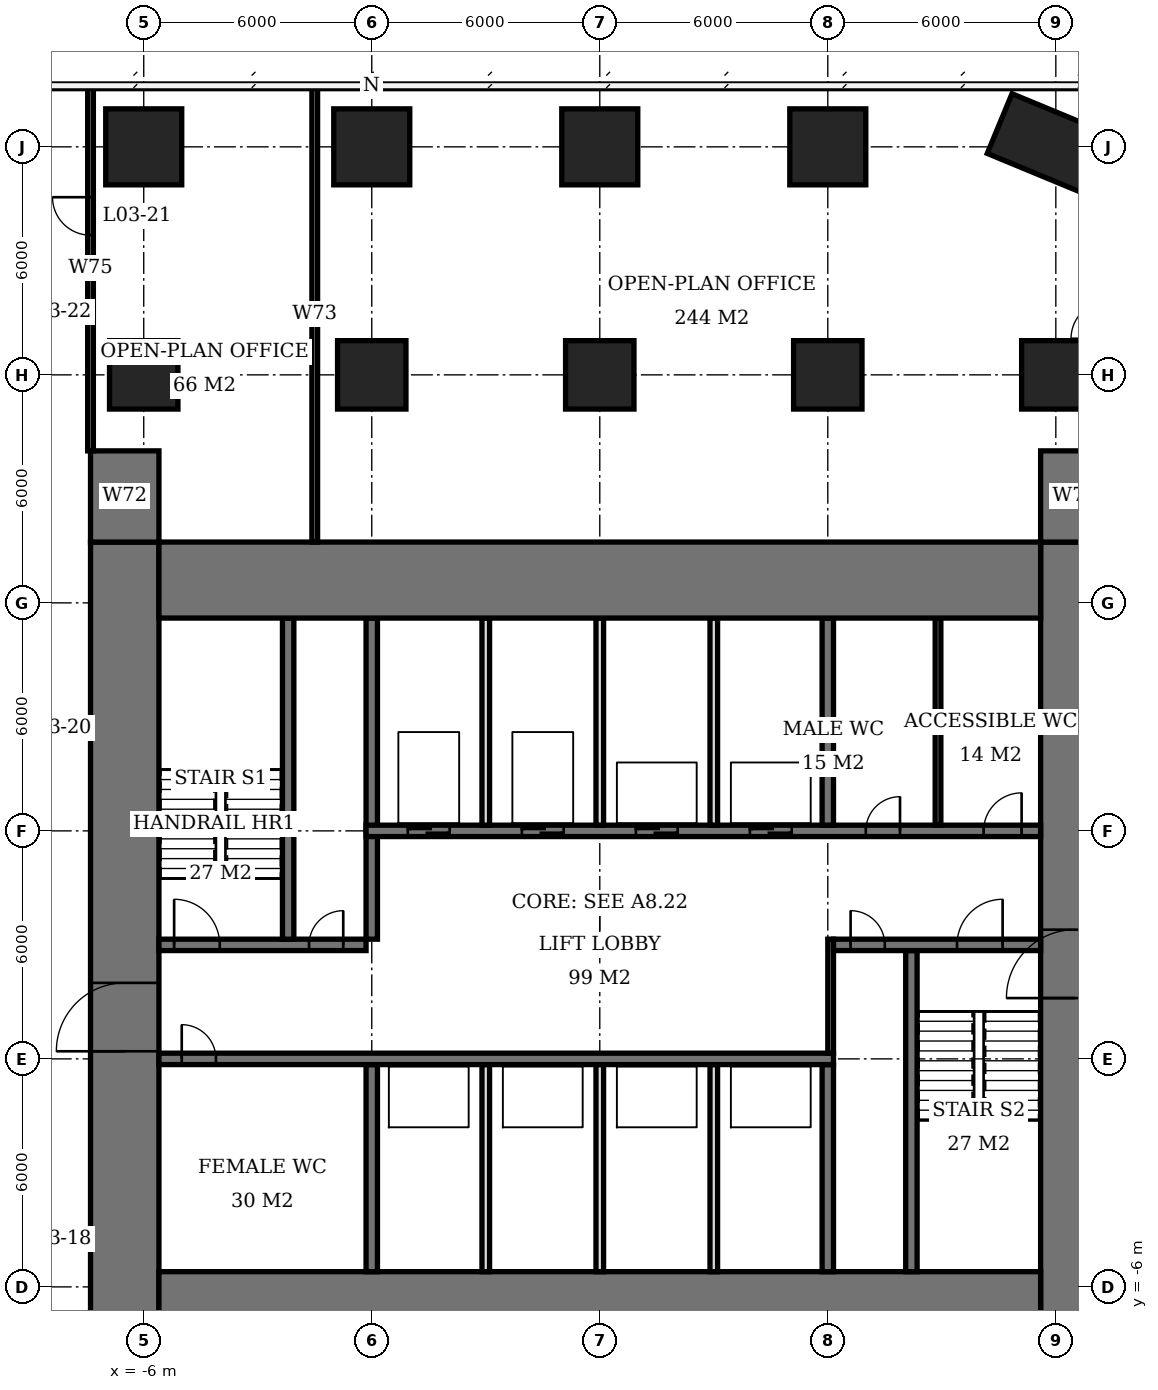
"""IFC4 building model, lengths in metres.
Left out: names, types, materials, properties, quantities, classifications, styles, units other than length and angle.
Written with IfcOpenShell. Run it as: python <this file> out.ifc"""

import sys

from ifc_helpers import new_model, si_unit, direction, frame, frame_2d, origin, origin_2d, place, context, subcontext, project, spatial, rectangle, extrude, element, fill, save


model = new_model("IFC4")
c1 = context("Model", 3, precision=1e-05, world=origin(), true_north=direction((0.0, 1.0)))
c2 = subcontext(c1, "Body", "Model", "MODEL_VIEW")
j1 = project(units=[si_unit("LENGTHUNIT", "METRE"), si_unit("PLANEANGLEUNIT", "RADIAN")], contexts=[c1])
p1 = place(None, origin())
s1 = spatial("IfcSite", under=j1, at=p1, CompositionType="ELEMENT")
p2 = place(p1, origin())
s2 = spatial("IfcBuilding", under=s1, at=p2, CompositionType="ELEMENT")
p3 = place(p2, frame((0.0, 0.0, 18.2)))
s3 = spatial("IfcBuildingStorey", under=s2, at=p3, CompositionType="ELEMENT", Elevation=18.2)
p4 = place(p3, frame((-6.0, 18.0, 0.0), z_axis=(0.0, 0.0, 1.0), x_axis=(1.0, 0.0, 0.0)))
e1 = element("IfcColumn", 1, at=p4, inside=s3, PredefinedType="COLUMN", context=c2, shape_type="SweptSolid", body=[
    extrude(rectangle(XDim=1.8, YDim=1.8, at=origin_2d()), origin(), (0.0, 0.0, 1.0), 3.9),
])
p5 = place(p3, frame((-6.0, 24.0, 0.0), z_axis=(0.0, 0.0, 1.0), x_axis=(1.0, 0.0, 0.0)))
e2 = element("IfcColumn", 2, at=p5, inside=s3, PredefinedType="COLUMN", context=c2, shape_type="SweptSolid", body=[
    extrude(rectangle(XDim=2.0, YDim=2.0, at=origin_2d()), origin(), (0.0, 0.0, 1.0), 3.9),
])
p6 = place(p3, frame((0.0, 18.0, 0.0), z_axis=(0.0, 0.0, 1.0), x_axis=(1.0, 0.0, 0.0)))
e3 = element("IfcColumn", 3, at=p6, inside=s3, PredefinedType="COLUMN", context=c2, shape_type="SweptSolid", body=[
    extrude(rectangle(XDim=1.8, YDim=1.8, at=origin_2d()), origin(), (0.0, 0.0, 1.0), 3.9),
])
p7 = place(p3, frame((0.0, 24.0, 0.0), z_axis=(0.0, 0.0, 1.0), x_axis=(1.0, 0.0, 0.0)))
e4 = element("IfcColumn", 4, at=p7, inside=s3, PredefinedType="COLUMN", context=c2, shape_type="SweptSolid", body=[
    extrude(rectangle(XDim=2.0, YDim=2.0, at=origin_2d()), origin(), (0.0, 0.0, 1.0), 3.9),
])
p8 = place(p3, frame((6.0, 18.0, 0.0), z_axis=(0.0, 0.0, 1.0), x_axis=(1.0, 0.0, 0.0)))
e5 = element("IfcColumn", 5, at=p8, inside=s3, PredefinedType="COLUMN", context=c2, shape_type="SweptSolid", body=[
    extrude(rectangle(XDim=1.8, YDim=1.8, at=origin_2d()), origin(), (0.0, 0.0, 1.0), 3.9),
])
p9 = place(p3, frame((6.0, 24.0, 0.0), z_axis=(0.0, 0.0, 1.0), x_axis=(1.0, 0.0, 0.0)))
e6 = element("IfcColumn", 6, at=p9, inside=s3, PredefinedType="COLUMN", context=c2, shape_type="SweptSolid", body=[
    extrude(rectangle(XDim=2.0, YDim=2.0, at=origin_2d()), origin(), (0.0, 0.0, 1.0), 3.9),
])
p10 = place(p3, frame((12.0, 18.0, 0.0), z_axis=(0.0, 0.0, 1.0), x_axis=(1.0, 0.0, 0.0)))
e7 = element("IfcColumn", 7, at=p10, inside=s3, PredefinedType="COLUMN", context=c2, shape_type="SweptSolid", body=[
    extrude(rectangle(XDim=1.8, YDim=1.8, at=origin_2d()), origin(), (0.0, 0.0, 1.0), 3.9),
])
p11 = place(p3, frame((12.0, 24.0, 0.0), z_axis=(0.0, 0.0, 1.0), x_axis=(1.0, 0.0, 0.0)))
e8 = element("IfcColumn", 8, at=p11, inside=s3, PredefinedType="COLUMN", context=c2, shape_type="SweptSolid", body=[
    extrude(rectangle(XDim=2.0, YDim=2.0, at=origin_2d()), origin(), (0.0, 0.0, 1.0), 3.9),
])
p12 = place(p3, frame((18.0, 18.0, 0.0), z_axis=(0.0, 0.0, 1.0), x_axis=(1.0, 0.0, 0.0)))
e9 = element("IfcColumn", 9, at=p12, inside=s3, PredefinedType="COLUMN", context=c2, shape_type="SweptSolid", body=[
    extrude(rectangle(XDim=1.8, YDim=1.8, at=origin_2d()), origin(), (0.0, 0.0, 1.0), 3.9),
])
p13 = place(p3, frame((18.0, 24.0, 0.0), z_axis=(0.0, 0.0, 1.0), x_axis=(0.923879532511, -0.382683432365, 0.0)))
e10 = element("IfcColumn", 10, at=p13, inside=s3, PredefinedType="COLUMN", context=c2, shape_type="SweptSolid", body=[
    extrude(rectangle(XDim=3.2, YDim=1.7, at=origin_2d()), origin(), (0.0, 0.0, 1.0), 3.9),
])
for number, where, z_axis, x_axis in (
    (11, (-5.6, -6.6, 0.0), (0.0, 0.0, 1.0), (1.0, 0.0, 0.0)),
    (12, (-5.6, 12.6, 0.0), (0.0, 0.0, 1.0), (1.0, 0.0, 0.0)),
):
    element("IfcWall", number, at=place(p3, frame(where, z_axis=z_axis, x_axis=x_axis)), inside=s3, PredefinedType="SHEAR", context=c2, shape_type="SweptSolid", body=[
        extrude(rectangle(XDim=23.2, YDim=2.0, at=frame_2d((11.6, 0.0))), origin(), (0.0, 0.0, 1.0), 3.9),
    ])
p14 = place(p3, frame((-6.5, -7.6, 0.0), z_axis=(0.0, 0.0, 1.0), x_axis=(0.0, 1.0, 0.0)))
e13 = element("IfcWall", 13, at=p14, inside=s3, PredefinedType="SHEAR", context=c2, shape_type="SweptSolid", body=[
    extrude(rectangle(XDim=21.2, YDim=1.8, at=frame_2d((10.6, 0.0))), origin(), (0.0, 0.0, 1.0), 3.9),
])
p15 = place(p14, frame((7.8, 0.0, 0.0)))
e14 = element("IfcOpeningElement", 14, at=p15, cuts=e13, PredefinedType="OPENING", context=c2, shape_type="SweptSolid", body=[
    extrude(rectangle(XDim=1.8, YDim=2.4, at=frame_2d((0.9, 1.2))), frame((0.0, 0.91, 0.0), z_axis=(0.0, -1.0, 0.0), x_axis=(1.0, 0.0, 0.0)), (0.0, 0.0, 1.0), 1.82),
])
p16 = place(p3, frame((18.5, -7.6, 0.0), z_axis=(0.0, 0.0, 1.0), x_axis=(0.0, 1.0, 0.0)))
e15 = element("IfcWall", 15, at=p16, inside=s3, PredefinedType="SHEAR", context=c2, shape_type="SweptSolid", body=[
    extrude(rectangle(XDim=21.2, YDim=1.8, at=frame_2d((10.6, 0.0))), origin(), (0.0, 0.0, 1.0), 3.9),
])
p17 = place(p16, frame((9.2, 0.0, 0.0)))
e16 = element("IfcOpeningElement", 16, at=p17, cuts=e15, PredefinedType="OPENING", context=c2, shape_type="SweptSolid", body=[
    extrude(rectangle(XDim=1.8, YDim=2.4, at=frame_2d((0.9, 1.2))), frame((0.0, 0.91, 0.0), z_axis=(0.0, -1.0, 0.0), x_axis=(1.0, 0.0, 0.0)), (0.0, 0.0, 1.0), 1.82),
])
for number, where, z_axis, x_axis in (
    (17, (-6.5, 13.6, 0.0), (0.0, 0.0, 1.0), (0.0, 1.0, 0.0)),
    (18, (18.5, 13.6, 0.0), (0.0, 0.0, 1.0), (0.0, 1.0, 0.0)),
):
    element("IfcWall", number, at=place(p3, frame(where, z_axis=z_axis, x_axis=x_axis)), inside=s3, PredefinedType="SHEAR", context=c2, shape_type="SweptSolid", body=[
        extrude(rectangle(XDim=2.4, YDim=1.8, at=frame_2d((1.2, 0.0))), origin(), (0.0, 0.0, 1.0), 3.9),
    ])
p18 = place(p3, frame((-5.6, 0.0, 0.0), z_axis=(0.0, 0.0, 1.0), x_axis=(1.0, 0.0, 0.0)))
e19 = element("IfcWall", 19, at=p18, inside=s3, PredefinedType="SHEAR", context=c2, shape_type="SweptSolid", body=[
    extrude(rectangle(XDim=17.75, YDim=0.3, at=frame_2d((8.875, 0.0))), origin(), (0.0, 0.0, 1.0), 3.9),
])
p19 = place(p18, frame((0.6, 0.0, 0.0)))
e20 = element("IfcOpeningElement", 20, at=p19, cuts=e19, PredefinedType="OPENING", context=c2, shape_type="SweptSolid", body=[
    extrude(rectangle(XDim=0.9, YDim=2.1, at=frame_2d((0.45, 1.05))), frame((0.0, 0.16, 0.0), z_axis=(0.0, -1.0, 0.0), x_axis=(1.0, 0.0, 0.0)), (0.0, 0.0, 1.0), 0.32),
])
p20 = place(p3, frame((-5.6, 3.0, 0.0), z_axis=(0.0, 0.0, 1.0), x_axis=(1.0, 0.0, 0.0)))
e21 = element("IfcWall", 21, at=p20, inside=s3, PredefinedType="SHEAR", context=c2, shape_type="SweptSolid", body=[
    extrude(rectangle(XDim=5.45, YDim=0.3, at=frame_2d((2.725, 0.0))), origin(), (0.0, 0.0, 1.0), 3.9),
])
p21 = place(p20, frame((0.4, 0.0, 0.0)))
e22 = element("IfcOpeningElement", 22, at=p21, cuts=e21, PredefinedType="OPENING", context=c2, shape_type="SweptSolid", body=[
    extrude(rectangle(XDim=1.2, YDim=2.1, at=frame_2d((0.6, 1.05))), frame((0.0, 0.16, 0.0), z_axis=(0.0, -1.0, 0.0), x_axis=(1.0, 0.0, 0.0)), (0.0, 0.0, 1.0), 0.32),
])
p22 = place(p20, frame((3.95, 0.0, 0.0)))
e23 = element("IfcOpeningElement", 23, at=p22, cuts=e21, PredefinedType="OPENING", context=c2, shape_type="SweptSolid", body=[
    extrude(rectangle(XDim=0.9, YDim=2.1, at=frame_2d((0.45, 1.05))), frame((0.0, 0.16, 0.0), z_axis=(0.0, -1.0, 0.0), x_axis=(1.0, 0.0, 0.0)), (0.0, 0.0, 1.0), 0.32),
])
p23 = place(p3, frame((12.15, 3.0, 0.0), z_axis=(0.0, 0.0, 1.0), x_axis=(1.0, 0.0, 0.0)))
e24 = element("IfcWall", 24, at=p23, inside=s3, PredefinedType="SHEAR", context=c2, shape_type="SweptSolid", body=[
    extrude(rectangle(XDim=5.45, YDim=0.3, at=frame_2d((2.725, 0.0))), origin(), (0.0, 0.0, 1.0), 3.9),
])
p24 = place(p23, frame((3.25, 0.0, 0.0)))
e25 = element("IfcOpeningElement", 25, at=p24, cuts=e24, PredefinedType="OPENING", context=c2, shape_type="SweptSolid", body=[
    extrude(rectangle(XDim=1.2, YDim=2.1, at=frame_2d((0.6, 1.05))), frame((0.0, 0.16, 0.0), z_axis=(0.0, -1.0, 0.0), x_axis=(1.0, 0.0, 0.0)), (0.0, 0.0, 1.0), 0.32),
])
p25 = place(p23, frame((0.45, 0.0, 0.0)))
e26 = element("IfcOpeningElement", 26, at=p25, cuts=e24, PredefinedType="OPENING", context=c2, shape_type="SweptSolid", body=[
    extrude(rectangle(XDim=0.9, YDim=2.1, at=frame_2d((0.45, 1.05))), frame((0.0, 0.16, 0.0), z_axis=(0.0, -1.0, 0.0), x_axis=(1.0, 0.0, 0.0)), (0.0, 0.0, 1.0), 0.32),
])
p26 = place(p3, frame((-0.15, 6.0, 0.0), z_axis=(0.0, 0.0, 1.0), x_axis=(1.0, 0.0, 0.0)))
e27 = element("IfcWall", 27, at=p26, inside=s3, PredefinedType="SHEAR", context=c2, shape_type="SweptSolid", body=[
    extrude(rectangle(XDim=17.75, YDim=0.3, at=frame_2d((8.875, 0.0))), origin(), (0.0, 0.0, 1.0), 3.9),
])
p27 = place(p26, frame((13.15, 0.0, 0.0)))
e28 = element("IfcOpeningElement", 28, at=p27, cuts=e27, PredefinedType="OPENING", context=c2, shape_type="SweptSolid", body=[
    extrude(rectangle(XDim=0.9, YDim=2.1, at=frame_2d((0.45, 1.05))), frame((0.0, 0.16, 0.0), z_axis=(0.0, -1.0, 0.0), x_axis=(1.0, 0.0, 0.0)), (0.0, 0.0, 1.0), 0.32),
])
p28 = place(p26, frame((16.25, 0.0, 0.0)))
e29 = element("IfcOpeningElement", 29, at=p28, cuts=e27, PredefinedType="OPENING", context=c2, shape_type="SweptSolid", body=[
    extrude(rectangle(XDim=1.0, YDim=2.1, at=frame_2d((0.5, 1.05))), frame((0.0, 0.16, 0.0), z_axis=(0.0, -1.0, 0.0), x_axis=(1.0, 0.0, 0.0)), (0.0, 0.0, 1.0), 0.32),
])
p29 = place(p26, frame((1.1, 0.0, 0.0)))
e30 = element("IfcOpeningElement", 30, at=p29, cuts=e27, PredefinedType="OPENING", context=c2, shape_type="SweptSolid", body=[
    extrude(rectangle(XDim=1.1, YDim=2.1, at=frame_2d((0.55, 1.05))), frame((0.0, 0.16, 0.0), z_axis=(0.0, -1.0, 0.0), x_axis=(1.0, 0.0, 0.0)), (0.0, 0.0, 1.0), 0.32),
])
p30 = place(p26, frame((4.1, 0.0, 0.0)))
e31 = element("IfcOpeningElement", 31, at=p30, cuts=e27, PredefinedType="OPENING", context=c2, shape_type="SweptSolid", body=[
    extrude(rectangle(XDim=1.1, YDim=2.1, at=frame_2d((0.55, 1.05))), frame((0.0, 0.16, 0.0), z_axis=(0.0, -1.0, 0.0), x_axis=(1.0, 0.0, 0.0)), (0.0, 0.0, 1.0), 0.32),
])
p31 = place(p26, frame((7.1, 0.0, 0.0)))
e32 = element("IfcOpeningElement", 32, at=p31, cuts=e27, PredefinedType="OPENING", context=c2, shape_type="SweptSolid", body=[
    extrude(rectangle(XDim=1.1, YDim=2.1, at=frame_2d((0.55, 1.05))), frame((0.0, 0.16, 0.0), z_axis=(0.0, -1.0, 0.0), x_axis=(1.0, 0.0, 0.0)), (0.0, 0.0, 1.0), 0.32),
])
p32 = place(p26, frame((10.1, 0.0, 0.0)))
e33 = element("IfcOpeningElement", 33, at=p32, cuts=e27, PredefinedType="OPENING", context=c2, shape_type="SweptSolid", body=[
    extrude(rectangle(XDim=1.1, YDim=2.1, at=frame_2d((0.55, 1.05))), frame((0.0, 0.16, 0.0), z_axis=(0.0, -1.0, 0.0), x_axis=(1.0, 0.0, 0.0)), (0.0, 0.0, 1.0), 0.32),
])
p33 = place(p3, frame((0.0, -5.6, 0.0), z_axis=(0.0, 0.0, 1.0), x_axis=(0.0, 1.0, 0.0)))
e34 = element("IfcWall", 34, at=p33, inside=s3, PredefinedType="SHEAR", context=c2, shape_type="SweptSolid", body=[
    extrude(rectangle(XDim=5.45, YDim=0.3, at=frame_2d((2.725, 0.0))), origin(), (0.0, 0.0, 1.0), 3.9),
])
p34 = place(p3, frame((0.0, 3.15, 0.0), z_axis=(0.0, 0.0, 1.0), x_axis=(0.0, 1.0, 0.0)))
e35 = element("IfcWall", 35, at=p34, inside=s3, PredefinedType="SHEAR", context=c2, shape_type="SweptSolid", body=[
    extrude(rectangle(XDim=8.45, YDim=0.3, at=frame_2d((4.225, 0.0))), origin(), (0.0, 0.0, 1.0), 3.9),
])
for number, where, z_axis, x_axis in (
    (36, (12.0, -5.6, 0.0), (0.0, 0.0, 1.0), (0.0, 1.0, 0.0)),
    (37, (12.0, 6.15, 0.0), (0.0, 0.0, 1.0), (0.0, 1.0, 0.0)),
):
    element("IfcWall", number, at=place(p3, frame(where, z_axis=z_axis, x_axis=x_axis)), inside=s3, PredefinedType="SHEAR", context=c2, shape_type="SweptSolid", body=[
        extrude(rectangle(XDim=5.45, YDim=0.3, at=frame_2d((2.725, 0.0))), origin(), (0.0, 0.0, 1.0), 3.9),
    ])
for number, where, z_axis, x_axis in (
    (38, (-2.2, 3.15, 0.0), (0.0, 0.0, 1.0), (0.0, 1.0, 0.0)),
    (39, (14.2, -5.6, 0.0), (0.0, 0.0, 1.0), (0.0, 1.0, 0.0)),
):
    element("IfcWall", number, at=place(p3, frame(where, z_axis=z_axis, x_axis=x_axis)), inside=s3, PredefinedType="SHEAR", context=c2, shape_type="SweptSolid", body=[
        extrude(rectangle(XDim=8.45, YDim=0.3, at=frame_2d((4.225, 0.0))), origin(), (0.0, 0.0, 1.0), 3.9),
    ])
for number, where, z_axis, x_axis in (
    (40, (3.0, 6.15, 0.0), (0.0, 0.0, 1.0), (0.0, 1.0, 0.0)),
    (41, (6.0, 6.15, 0.0), (0.0, 0.0, 1.0), (0.0, 1.0, 0.0)),
    (42, (9.0, 6.15, 0.0), (0.0, 0.0, 1.0), (0.0, 1.0, 0.0)),
    (43, (3.0, -5.6, 0.0), (0.0, 0.0, 1.0), (0.0, 1.0, 0.0)),
    (44, (6.0, -5.6, 0.0), (0.0, 0.0, 1.0), (0.0, 1.0, 0.0)),
    (45, (9.0, -5.6, 0.0), (0.0, 0.0, 1.0), (0.0, 1.0, 0.0)),
):
    element("IfcWall", number, at=place(p3, frame(where, z_axis=z_axis, x_axis=x_axis)), inside=s3, PredefinedType="SOLIDWALL", context=c2, shape_type="SweptSolid", body=[
        extrude(rectangle(XDim=5.45, YDim=0.2, at=frame_2d((2.725, 0.0))), origin(), (0.0, 0.0, 1.0), 3.9),
    ])
p35 = place(p3, frame((14.9, 6.15, 0.0), z_axis=(0.0, 0.0, 1.0), x_axis=(0.0, 1.0, 0.0)))
e46 = element("IfcWall", 46, at=p35, inside=s3, PredefinedType="PLUMBINGWALL", context=c2, shape_type="SweptSolid", body=[
    extrude(rectangle(XDim=5.45, YDim=0.15, at=frame_2d((2.725, 0.0))), origin(), (0.0, 0.0, 1.0), 3.65),
])
p36 = place(p3, frame((-7.4, 16.0, 0.0), z_axis=(0.0, 0.0, 1.0), x_axis=(0.0, 1.0, 0.0)))
e47 = element("IfcWall", 47, at=p36, inside=s3, PredefinedType="PARTITIONING", context=c2, shape_type="SweptSolid", body=[
    extrude(rectangle(XDim=9.6, YDim=0.15, at=frame_2d((4.8, 0.0))), origin(), (0.0, 0.0, 1.0), 3.65),
])
p37 = place(p36, frame((5.675, 0.0, 0.0)))
e48 = element("IfcOpeningElement", 48, at=p37, cuts=e47, PredefinedType="OPENING", context=c2, shape_type="SweptSolid", body=[
    extrude(rectangle(XDim=1.0, YDim=2.1, at=frame_2d((0.5, 1.05))), frame((0.0, 0.085, 0.0), z_axis=(0.0, -1.0, 0.0), x_axis=(1.0, 0.0, 0.0)), (0.0, 0.0, 1.0), 0.17),
])
p38 = place(p3, frame((-1.5, 13.6, 0.0), z_axis=(0.0, 0.0, 1.0), x_axis=(0.0, 1.0, 0.0)))
e49 = element("IfcWall", 49, at=p38, inside=s3, PredefinedType="PARTITIONING", context=c2, shape_type="SweptSolid", body=[
    extrude(rectangle(XDim=12.0, YDim=0.15, at=frame_2d((6.0, 0.0))), origin(), (0.0, 0.0, 1.0), 3.65),
])
p39 = place(p3, frame((12.075, 0.15, 0.0), z_axis=(0.0, 0.0, 1.0), x_axis=(0.0, 1.0, 0.0)))
e50 = element("IfcWall", 50, at=p39, inside=s3, PredefinedType="PARTITIONING", context=c2, shape_type="SweptSolid", body=[
    extrude(rectangle(XDim=3.0, YDim=0.15, at=frame_2d((1.5, 0.0))), origin(), (0.0, 0.0, 1.0), 3.65),
])
p40 = place(p15, origin())
e51 = element("IfcDoor", 51, at=p40, inside=s3, OperationType="DOUBLE_DOOR_SINGLE_SWING", PredefinedType="DOOR", context=c2, shape_type="SweptSolid", body=[
    extrude(rectangle(XDim=1.8, YDim=2.4, at=frame_2d((0.9, 1.2))), frame((0.0, 0.025, 0.0), z_axis=(0.0, -1.0, 0.0), x_axis=(1.0, 0.0, 0.0)), (0.0, 0.0, 1.0), 0.05),
])
fill(e14, e51)
p41 = place(p17, origin())
e52 = element("IfcDoor", 52, at=p41, inside=s3, OperationType="DOUBLE_DOOR_SINGLE_SWING", PredefinedType="DOOR", context=c2, shape_type="SweptSolid", body=[
    extrude(rectangle(XDim=1.8, YDim=2.4, at=frame_2d((0.9, 1.2))), frame((0.0, 0.025, 0.0), z_axis=(0.0, -1.0, 0.0), x_axis=(1.0, 0.0, 0.0)), (0.0, 0.0, 1.0), 0.05),
])
fill(e16, e52)
p42 = place(p21, origin())
e53 = element("IfcDoor", 53, at=p42, inside=s3, OperationType="SINGLE_SWING_LEFT", PredefinedType="DOOR", context=c2, shape_type="SweptSolid", body=[
    extrude(rectangle(XDim=1.2, YDim=2.1, at=frame_2d((0.6, 1.05))), frame((0.0, 0.025, 0.0), z_axis=(0.0, -1.0, 0.0), x_axis=(1.0, 0.0, 0.0)), (0.0, 0.0, 1.0), 0.05),
])
fill(e22, e53)
p43 = place(p22, origin())
e54 = element("IfcDoor", 54, at=p43, inside=s3, OperationType="SINGLE_SWING_RIGHT", PredefinedType="DOOR", context=c2, shape_type="SweptSolid", body=[
    extrude(rectangle(XDim=0.9, YDim=2.1, at=frame_2d((0.45, 1.05))), frame((0.0, 0.025, 0.0), z_axis=(0.0, -1.0, 0.0), x_axis=(1.0, 0.0, 0.0)), (0.0, 0.0, 1.0), 0.05),
])
fill(e23, e54)
p44 = place(p24, origin())
e55 = element("IfcDoor", 55, at=p44, inside=s3, OperationType="SINGLE_SWING_RIGHT", PredefinedType="DOOR", context=c2, shape_type="SweptSolid", body=[
    extrude(rectangle(XDim=1.2, YDim=2.1, at=frame_2d((0.6, 1.05))), frame((0.0, 0.025, 0.0), z_axis=(0.0, -1.0, 0.0), x_axis=(1.0, 0.0, 0.0)), (0.0, 0.0, 1.0), 0.05),
])
fill(e25, e55)
p45 = place(p25, origin())
e56 = element("IfcDoor", 56, at=p45, inside=s3, OperationType="SINGLE_SWING_LEFT", PredefinedType="DOOR", context=c2, shape_type="SweptSolid", body=[
    extrude(rectangle(XDim=0.9, YDim=2.1, at=frame_2d((0.45, 1.05))), frame((0.0, 0.025, 0.0), z_axis=(0.0, -1.0, 0.0), x_axis=(1.0, 0.0, 0.0)), (0.0, 0.0, 1.0), 0.05),
])
fill(e26, e56)
p46 = place(p19, origin())
e57 = element("IfcDoor", 57, at=p46, inside=s3, OperationType="SINGLE_SWING_LEFT", PredefinedType="DOOR", context=c2, shape_type="SweptSolid", body=[
    extrude(rectangle(XDim=0.9, YDim=2.1, at=frame_2d((0.45, 1.05))), frame((0.0, 0.025, 0.0), z_axis=(0.0, -1.0, 0.0), x_axis=(1.0, 0.0, 0.0)), (0.0, 0.0, 1.0), 0.05),
])
fill(e20, e57)
p47 = place(p27, origin())
e58 = element("IfcDoor", 58, at=p47, inside=s3, OperationType="SINGLE_SWING_RIGHT", PredefinedType="DOOR", context=c2, shape_type="SweptSolid", body=[
    extrude(rectangle(XDim=0.9, YDim=2.1, at=frame_2d((0.45, 1.05))), frame((0.0, 0.025, 0.0), z_axis=(0.0, -1.0, 0.0), x_axis=(1.0, 0.0, 0.0)), (0.0, 0.0, 1.0), 0.05),
])
fill(e28, e58)
p48 = place(p28, origin())
e59 = element("IfcDoor", 59, at=p48, inside=s3, OperationType="SINGLE_SWING_RIGHT", PredefinedType="DOOR", context=c2, shape_type="SweptSolid", body=[
    extrude(rectangle(XDim=1.0, YDim=2.1, at=frame_2d((0.5, 1.05))), frame((0.0, 0.025, 0.0), z_axis=(0.0, -1.0, 0.0), x_axis=(1.0, 0.0, 0.0)), (0.0, 0.0, 1.0), 0.05),
])
fill(e29, e59)
p49 = place(p29, origin())
e60 = element("IfcDoor", 60, at=p49, inside=s3, OperationType="DOUBLE_DOOR_SLIDING", PredefinedType="USERDEFINED", context=c2, shape_type="SweptSolid", body=[
    extrude(rectangle(XDim=1.1, YDim=2.1, at=frame_2d((0.55, 1.05))), frame((0.0, 0.025, 0.0), z_axis=(0.0, -1.0, 0.0), x_axis=(1.0, 0.0, 0.0)), (0.0, 0.0, 1.0), 0.05),
])
fill(e30, e60)
p50 = place(p30, origin())
e61 = element("IfcDoor", 61, at=p50, inside=s3, OperationType="DOUBLE_DOOR_SLIDING", PredefinedType="USERDEFINED", context=c2, shape_type="SweptSolid", body=[
    extrude(rectangle(XDim=1.1, YDim=2.1, at=frame_2d((0.55, 1.05))), frame((0.0, 0.025, 0.0), z_axis=(0.0, -1.0, 0.0), x_axis=(1.0, 0.0, 0.0)), (0.0, 0.0, 1.0), 0.05),
])
fill(e31, e61)
p51 = place(p31, origin())
e62 = element("IfcDoor", 62, at=p51, inside=s3, OperationType="DOUBLE_DOOR_SLIDING", PredefinedType="USERDEFINED", context=c2, shape_type="SweptSolid", body=[
    extrude(rectangle(XDim=1.1, YDim=2.1, at=frame_2d((0.55, 1.05))), frame((0.0, 0.025, 0.0), z_axis=(0.0, -1.0, 0.0), x_axis=(1.0, 0.0, 0.0)), (0.0, 0.0, 1.0), 0.05),
])
fill(e32, e62)
p52 = place(p32, origin())
e63 = element("IfcDoor", 63, at=p52, inside=s3, OperationType="DOUBLE_DOOR_SLIDING", PredefinedType="USERDEFINED", context=c2, shape_type="SweptSolid", body=[
    extrude(rectangle(XDim=1.1, YDim=2.1, at=frame_2d((0.55, 1.05))), frame((0.0, 0.025, 0.0), z_axis=(0.0, -1.0, 0.0), x_axis=(1.0, 0.0, 0.0)), (0.0, 0.0, 1.0), 0.05),
])
fill(e33, e63)
p53 = place(p37, origin())
e64 = element("IfcDoor", 64, at=p53, inside=s3, OperationType="SINGLE_SWING_RIGHT", PredefinedType="DOOR", context=c2, shape_type="SweptSolid", body=[
    extrude(rectangle(XDim=1.0, YDim=2.1, at=frame_2d((0.5, 1.05))), frame((0.0, 0.025, 0.0), z_axis=(0.0, -1.0, 0.0), x_axis=(1.0, 0.0, 0.0)), (0.0, 0.0, 1.0), 0.05),
])
fill(e48, e64)
save(model, sys.argv[1])
